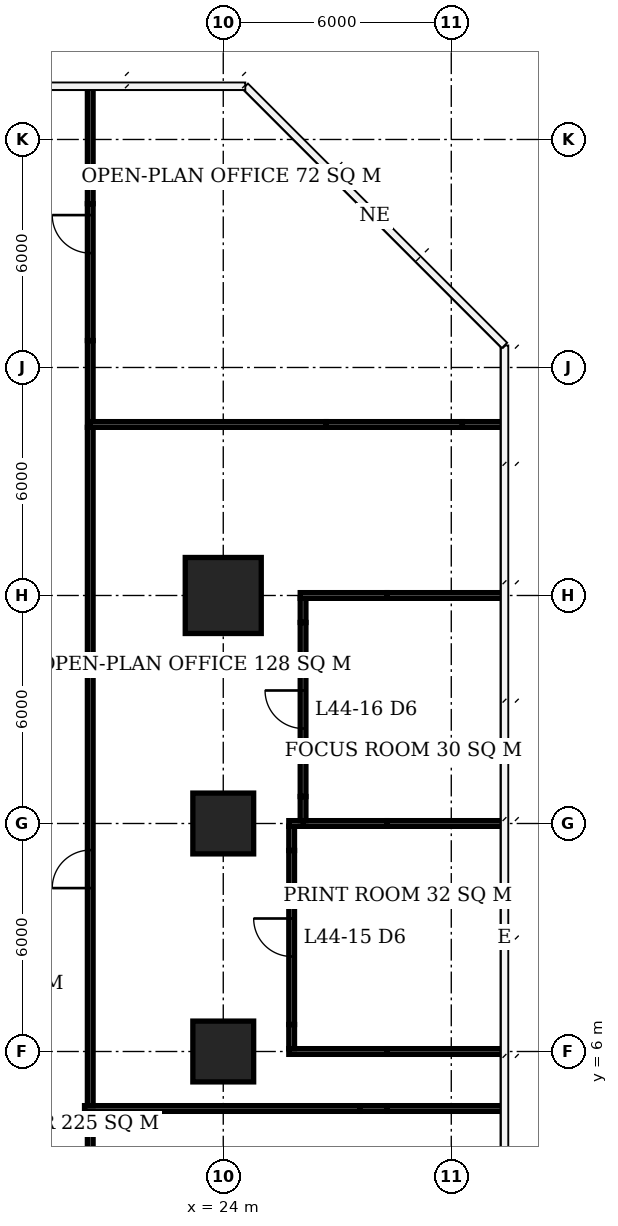
"""IFC4 building model, lengths in metres.
Left out: names, types, materials, properties, quantities, classifications, styles, units other than length and angle.
Written with IfcOpenShell. Run it as: python <this file> out.ifc"""

import sys

from ifc_helpers import new_model, si_unit, direction, frame, frame_2d, origin, origin_2d, place, context, subcontext, project, spatial, rectangle, extrude, element, fill, save


model = new_model("IFC4")
c1 = context("Model", 3, precision=1e-05, world=origin(), true_north=direction((0.0, 1.0)))
c2 = subcontext(c1, "Body", "Model", "MODEL_VIEW")
j1 = project(units=[si_unit("LENGTHUNIT", "METRE"), si_unit("PLANEANGLEUNIT", "RADIAN")], contexts=[c1])
p1 = place(None, origin())
s1 = spatial("IfcSite", under=j1, at=p1, CompositionType="ELEMENT")
p2 = place(p1, origin())
s2 = spatial("IfcBuilding", under=s1, at=p2, CompositionType="ELEMENT")
p3 = place(p2, frame((0.0, 0.0, 181.1)))
s3 = spatial("IfcBuildingStorey", under=s2, at=p3, CompositionType="ELEMENT", Elevation=181.1)
for number, where, z_axis, x_axis in (
    (1, (24.0, 6.0, 0.0), (0.0, 0.0, 1.0), (1.0, 0.0, 0.0)),
    (2, (24.0, 12.0, 0.0), (0.0, 0.0, 1.0), (1.0, 0.0, 0.0)),
):
    element("IfcColumn", number, at=place(p3, frame(where, z_axis=z_axis, x_axis=x_axis)), inside=s3, PredefinedType="COLUMN", context=c2, shape_type="SweptSolid", body=[
        extrude(rectangle(XDim=1.6, YDim=1.6, at=origin_2d()), origin(), (0.0, 0.0, 1.0), 3.9),
    ])
p4 = place(p3, frame((24.0, 18.0, 0.0), z_axis=(0.0, 0.0, 1.0), x_axis=(1.0, 0.0, 0.0)))
e3 = element("IfcColumn", 3, at=p4, inside=s3, PredefinedType="COLUMN", context=c2, shape_type="SweptSolid", body=[
    extrude(rectangle(XDim=2.0, YDim=2.0, at=origin_2d()), origin(), (0.0, 0.0, 1.0), 3.9),
])
p5 = place(p3, frame((25.725, 6.0, 0.0), z_axis=(0.0, 0.0, 1.0), x_axis=(1.0, 0.0, 0.0)))
e4 = element("IfcWall", 4, at=p5, inside=s3, PredefinedType="PARTITIONING", context=c2, shape_type="SweptSolid", body=[
    extrude(rectangle(XDim=2.585, YDim=0.15, at=frame_2d((1.292, 0.0))), origin(), (0.0, 0.0, 1.0), 2.65),
])
p6 = place(p3, frame((28.31, 6.0, 0.0), z_axis=(0.0, 0.0, 1.0), x_axis=(1.0, 0.0, 0.0)))
e5 = element("IfcWall", 5, at=p6, inside=s3, PredefinedType="PARTITIONING", context=c2, shape_type="SweptSolid", body=[
    extrude(rectangle(XDim=3.04, YDim=0.15, at=frame_2d((1.52, 0.0))), origin(), (0.0, 0.0, 1.0), 3.65),
])
p7 = place(p3, frame((25.725, 12.0, 0.0), z_axis=(0.0, 0.0, 1.0), x_axis=(1.0, 0.0, 0.0)))
e6 = element("IfcWall", 6, at=p7, inside=s3, PredefinedType="PARTITIONING", context=c2, shape_type="SweptSolid", body=[
    extrude(rectangle(XDim=0.45, YDim=0.15, at=frame_2d((0.225, 0.0))), origin(), (0.0, 0.0, 1.0), 2.65),
])
p8 = place(p3, frame((26.1, 12.0, 0.0), z_axis=(0.0, 0.0, 1.0), x_axis=(1.0, 0.0, 0.0)))
e7 = element("IfcWall", 7, at=p8, inside=s3, PredefinedType="PARTITIONING", context=c2, shape_type="SweptSolid", body=[
    extrude(rectangle(XDim=2.21, YDim=0.15, at=frame_2d((1.105, 0.0))), origin(), (0.0, 0.0, 1.0), 2.65),
])
p9 = place(p3, frame((28.31, 12.0, 0.0), z_axis=(0.0, 0.0, 1.0), x_axis=(1.0, 0.0, 0.0)))
e8 = element("IfcWall", 8, at=p9, inside=s3, PredefinedType="PARTITIONING", context=c2, shape_type="SweptSolid", body=[
    extrude(rectangle(XDim=3.04, YDim=0.15, at=frame_2d((1.52, 0.0))), origin(), (0.0, 0.0, 1.0), 3.65),
])
p10 = place(p3, frame((26.025, 18.0, 0.0), z_axis=(0.0, 0.0, 1.0), x_axis=(1.0, 0.0, 0.0)))
e9 = element("IfcWall", 9, at=p10, inside=s3, PredefinedType="PARTITIONING", context=c2, shape_type="SweptSolid", body=[
    extrude(rectangle(XDim=2.285, YDim=0.15, at=frame_2d((1.143, 0.0))), origin(), (0.0, 0.0, 1.0), 2.65),
])
p11 = place(p3, frame((28.31, 18.0, 0.0), z_axis=(0.0, 0.0, 1.0), x_axis=(1.0, 0.0, 0.0)))
e10 = element("IfcWall", 10, at=p11, inside=s3, PredefinedType="PARTITIONING", context=c2, shape_type="SweptSolid", body=[
    extrude(rectangle(XDim=3.09, YDim=0.15, at=frame_2d((1.545, 0.0))), origin(), (0.0, 0.0, 1.0), 3.65),
])
p12 = place(p3, frame((25.8, 6.075, 0.0), z_axis=(0.0, 0.0, 1.0), x_axis=(0.0, 1.0, 0.0)))
e11 = element("IfcWall", 11, at=p12, inside=s3, PredefinedType="PARTITIONING", context=c2, shape_type="SweptSolid", body=[
    extrude(rectangle(XDim=0.635, YDim=0.15, at=frame_2d((0.317, 0.0))), origin(), (0.0, 0.0, 1.0), 2.65),
])
p13 = place(p3, frame((25.8, 6.71, 0.0), z_axis=(0.0, 0.0, 1.0), x_axis=(0.0, 1.0, 0.0)))
e12 = element("IfcWall", 12, at=p13, inside=s3, PredefinedType="PARTITIONING", context=c2, shape_type="SweptSolid", body=[
    extrude(rectangle(XDim=4.58, YDim=0.15, at=frame_2d((2.29, 0.0))), origin(), (0.0, 0.0, 1.0), 3.65),
])
p14 = place(p13, frame((1.79, 0.0, 0.0)))
e13 = element("IfcOpeningElement", 13, at=p14, cuts=e12, PredefinedType="OPENING", context=c2, shape_type="SweptSolid", body=[
    extrude(rectangle(XDim=1.0, YDim=2.1, at=frame_2d((0.5, 1.05))), frame((0.0, 0.085, 0.0), z_axis=(0.0, -1.0, 0.0), x_axis=(1.0, 0.0, 0.0)), (0.0, 0.0, 1.0), 0.17),
])
for number, where, z_axis, x_axis in (
    (14, (25.8, 11.29, 0.0), (0.0, 0.0, 1.0), (0.0, 1.0, 0.0)),
    (15, (26.1, 12.075, 0.0), (0.0, 0.0, 1.0), (0.0, 1.0, 0.0)),
):
    element("IfcWall", number, at=place(p3, frame(where, z_axis=z_axis, x_axis=x_axis)), inside=s3, PredefinedType="PARTITIONING", context=c2, shape_type="SweptSolid", body=[
        extrude(rectangle(XDim=0.635, YDim=0.15, at=frame_2d((0.317, 0.0))), origin(), (0.0, 0.0, 1.0), 2.65),
    ])
p15 = place(p3, frame((26.1, 12.71, 0.0), z_axis=(0.0, 0.0, 1.0), x_axis=(0.0, 1.0, 0.0)))
e16 = element("IfcWall", 16, at=p15, inside=s3, PredefinedType="PARTITIONING", context=c2, shape_type="SweptSolid", body=[
    extrude(rectangle(XDim=4.58, YDim=0.15, at=frame_2d((2.29, 0.0))), origin(), (0.0, 0.0, 1.0), 3.65),
])
p16 = place(p15, frame((1.79, 0.0, 0.0)))
e17 = element("IfcOpeningElement", 17, at=p16, cuts=e16, PredefinedType="OPENING", context=c2, shape_type="SweptSolid", body=[
    extrude(rectangle(XDim=1.0, YDim=2.1, at=frame_2d((0.5, 1.05))), frame((0.0, 0.085, 0.0), z_axis=(0.0, -1.0, 0.0), x_axis=(1.0, 0.0, 0.0)), (0.0, 0.0, 1.0), 0.17),
])
p17 = place(p3, frame((26.1, 17.29, 0.0), z_axis=(0.0, 0.0, 1.0), x_axis=(0.0, 1.0, 0.0)))
e18 = element("IfcWall", 18, at=p17, inside=s3, PredefinedType="PARTITIONING", context=c2, shape_type="SweptSolid", body=[
    extrude(rectangle(XDim=0.635, YDim=0.15, at=frame_2d((0.317, 0.0))), origin(), (0.0, 0.0, 1.0), 2.65),
])
p18 = place(p3, frame((20.5, -13.4, 0.0), z_axis=(0.0, 0.0, 1.0), x_axis=(0.0, 1.0, 0.0)))
e19 = element("IfcWall", 19, at=p18, inside=s3, PredefinedType="PARTITIONING", context=c2, shape_type="SweptSolid", body=[
    extrude(rectangle(XDim=17.825, YDim=0.15, at=frame_2d((8.913, 0.0))), origin(), (0.0, 0.0, 1.0), 3.65),
])
p19 = place(p18, frame((11.17, 0.0, 0.0)))
e20 = element("IfcOpeningElement", 20, at=p19, cuts=e19, PredefinedType="OPENING", context=c2, shape_type="SweptSolid", body=[
    extrude(rectangle(XDim=1.0, YDim=2.1, at=frame_2d((0.5, 1.05))), frame((0.0, 0.085, 0.0), z_axis=(0.0, -1.0, 0.0), x_axis=(1.0, 0.0, 0.0)), (0.0, 0.0, 1.0), 0.17),
])
p20 = place(p3, frame((20.5, 4.575, 0.0), z_axis=(0.0, 0.0, 1.0), x_axis=(0.0, 1.0, 0.0)))
e21 = element("IfcWall", 21, at=p20, inside=s3, PredefinedType="PARTITIONING", context=c2, shape_type="SweptSolid", body=[
    extrude(rectangle(XDim=17.85, YDim=0.15, at=frame_2d((8.925, 0.0))), origin(), (0.0, 0.0, 1.0), 3.65),
])
p21 = place(p20, frame((5.725, 0.0, 0.0)))
e22 = element("IfcOpeningElement", 22, at=p21, cuts=e21, PredefinedType="OPENING", context=c2, shape_type="SweptSolid", body=[
    extrude(rectangle(XDim=1.0, YDim=2.1, at=frame_2d((0.5, 1.05))), frame((0.0, 0.085, 0.0), z_axis=(0.0, -1.0, 0.0), x_axis=(1.0, 0.0, 0.0)), (0.0, 0.0, 1.0), 0.17),
])
p22 = place(p3, frame((20.35, 4.5, 0.0), z_axis=(0.0, 0.0, 1.0), x_axis=(1.0, 0.0, 0.0)))
e23 = element("IfcWall", 23, at=p22, inside=s3, PredefinedType="PARTITIONING", context=c2, shape_type="SweptSolid", body=[
    extrude(rectangle(XDim=7.24, YDim=0.15, at=frame_2d((3.62, 0.0))), origin(), (0.0, 0.0, 1.0), 3.65),
])
p23 = place(p3, frame((27.59, 4.5, 0.0), z_axis=(0.0, 0.0, 1.0), x_axis=(1.0, 0.0, 0.0)))
e24 = element("IfcWall", 24, at=p23, inside=s3, PredefinedType="PARTITIONING", context=c2, shape_type="SweptSolid", body=[
    extrude(rectangle(XDim=0.72, YDim=0.15, at=frame_2d((0.36, 0.0))), origin(), (0.0, 0.0, 1.0), 2.65),
])
p24 = place(p3, frame((28.31, 4.5, 0.0), z_axis=(0.0, 0.0, 1.0), x_axis=(1.0, 0.0, 0.0)))
e25 = element("IfcWall", 25, at=p24, inside=s3, PredefinedType="PARTITIONING", context=c2, shape_type="SweptSolid", body=[
    extrude(rectangle(XDim=3.09, YDim=0.15, at=frame_2d((1.545, 0.0))), origin(), (0.0, 0.0, 1.0), 3.65),
])
p25 = place(p3, frame((20.5, 22.425, 0.0), z_axis=(0.0, 0.0, 1.0), x_axis=(0.0, 1.0, 0.0)))
e26 = element("IfcWall", 26, at=p25, inside=s3, PredefinedType="PARTITIONING", context=c2, shape_type="SweptSolid", body=[
    extrude(rectangle(XDim=2.283, YDim=0.15, at=frame_2d((1.142, 0.0))), origin(), (0.0, 0.0, 1.0), 3.65),
])
p26 = place(p3, frame((20.5, 24.708, 0.0), z_axis=(0.0, 0.0, 1.0), x_axis=(0.0, 1.0, 0.0)))
e27 = element("IfcWall", 27, at=p26, inside=s3, PredefinedType="PARTITIONING", context=c2, shape_type="SweptSolid", body=[
    extrude(rectangle(XDim=3.602, YDim=0.15, at=frame_2d((1.801, 0.0))), origin(), (0.0, 0.0, 1.0), 2.65),
])
p27 = place(p26, frame((2.302, 0.0, 0.0)))
e28 = element("IfcOpeningElement", 28, at=p27, cuts=e27, PredefinedType="OPENING", context=c2, shape_type="SweptSolid", body=[
    extrude(rectangle(XDim=1.0, YDim=2.1, at=frame_2d((0.5, 1.05))), frame((0.0, 0.085, 0.0), z_axis=(0.0, -1.0, 0.0), x_axis=(1.0, 0.0, 0.0)), (0.0, 0.0, 1.0), 0.17),
])
p28 = place(p3, frame((20.5, 28.31, 0.0), z_axis=(0.0, 0.0, 1.0), x_axis=(0.0, 1.0, 0.0)))
e29 = element("IfcWall", 29, at=p28, inside=s3, PredefinedType="PARTITIONING", context=c2, shape_type="SweptSolid", body=[
    extrude(rectangle(XDim=3.09, YDim=0.15, at=frame_2d((1.545, 0.0))), origin(), (0.0, 0.0, 1.0), 3.65),
])
p29 = place(p3, frame((20.5, 22.5, 0.0), z_axis=(0.0, 0.0, 1.0), x_axis=(1.0, 0.0, 0.0)))
e30 = element("IfcWall", 30, at=p29, inside=s3, PredefinedType="PARTITIONING", context=c2, shape_type="SweptSolid", body=[
    extrude(rectangle(XDim=6.208, YDim=0.15, at=frame_2d((3.104, 0.0))), origin(), (0.0, 0.0, 1.0), 3.65),
])
p30 = place(p3, frame((26.708, 22.5, 0.0), z_axis=(0.0, 0.0, 1.0), x_axis=(1.0, 0.0, 0.0)))
e31 = element("IfcWall", 31, at=p30, inside=s3, PredefinedType="PARTITIONING", context=c2, shape_type="SweptSolid", body=[
    extrude(rectangle(XDim=3.584, YDim=0.15, at=frame_2d((1.792, 0.0))), origin(), (0.0, 0.0, 1.0), 2.65),
])
p31 = place(p3, frame((30.292, 22.5, 0.0), z_axis=(0.0, 0.0, 1.0), x_axis=(1.0, 0.0, 0.0)))
e32 = element("IfcWall", 32, at=p31, inside=s3, PredefinedType="PARTITIONING", context=c2, shape_type="SweptSolid", body=[
    extrude(rectangle(XDim=1.108, YDim=0.15, at=frame_2d((0.554, 0.0))), origin(), (0.0, 0.0, 1.0), 3.65),
])
p32 = place(p14, origin())
e33 = element("IfcDoor", 33, at=p32, inside=s3, OperationType="SINGLE_SWING_RIGHT", PredefinedType="DOOR", context=c2, shape_type="SweptSolid", body=[
    extrude(rectangle(XDim=1.0, YDim=2.1, at=frame_2d((0.5, 1.05))), frame((0.0, 0.025, 0.0), z_axis=(0.0, -1.0, 0.0), x_axis=(1.0, 0.0, 0.0)), (0.0, 0.0, 1.0), 0.05),
])
fill(e13, e33)
p33 = place(p16, origin())
e34 = element("IfcDoor", 34, at=p33, inside=s3, OperationType="SINGLE_SWING_RIGHT", PredefinedType="DOOR", context=c2, shape_type="SweptSolid", body=[
    extrude(rectangle(XDim=1.0, YDim=2.1, at=frame_2d((0.5, 1.05))), frame((0.0, 0.025, 0.0), z_axis=(0.0, -1.0, 0.0), x_axis=(1.0, 0.0, 0.0)), (0.0, 0.0, 1.0), 0.05),
])
fill(e17, e34)
p34 = place(p21, origin())
e35 = element("IfcDoor", 35, at=p34, inside=s3, OperationType="SINGLE_SWING_LEFT", PredefinedType="DOOR", context=c2, shape_type="SweptSolid", body=[
    extrude(rectangle(XDim=1.0, YDim=2.1, at=frame_2d((0.5, 1.05))), frame((0.0, 0.025, 0.0), z_axis=(0.0, -1.0, 0.0), x_axis=(1.0, 0.0, 0.0)), (0.0, 0.0, 1.0), 0.05),
])
fill(e22, e35)
p35 = place(p27, origin())
e36 = element("IfcDoor", 36, at=p35, inside=s3, OperationType="SINGLE_SWING_RIGHT", PredefinedType="DOOR", context=c2, shape_type="SweptSolid", body=[
    extrude(rectangle(XDim=1.0, YDim=2.1, at=frame_2d((0.5, 1.05))), frame((0.0, 0.025, 0.0), z_axis=(0.0, -1.0, 0.0), x_axis=(1.0, 0.0, 0.0)), (0.0, 0.0, 1.0), 0.05),
])
fill(e28, e36)
save(model, sys.argv[1])
